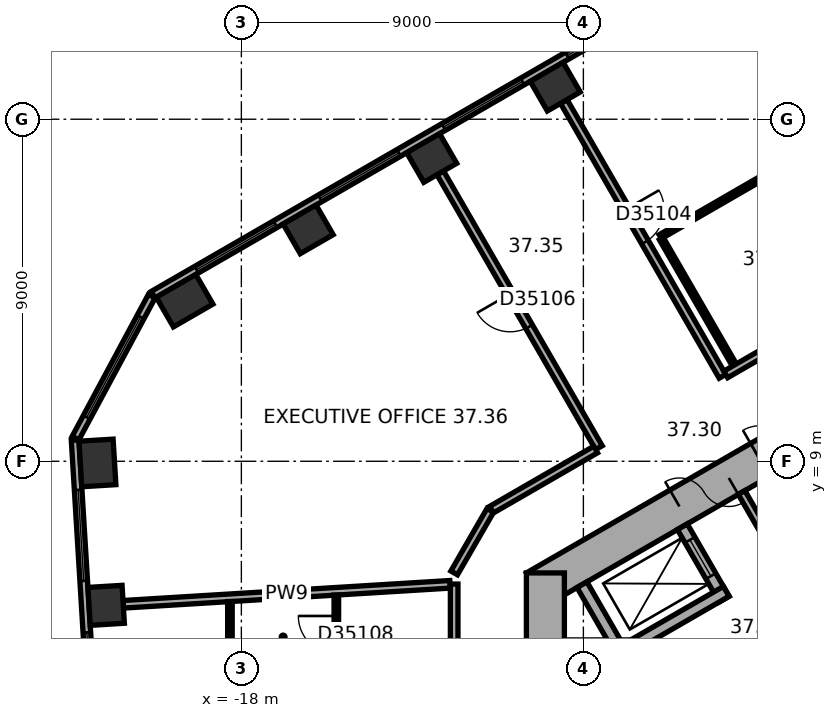
"""IFC4 building model, lengths in metres.
Left out: names, types, materials, properties, quantities, classifications, styles, units other than length and angle.
Written with IfcOpenShell. Run it as: python <this file> out.ifc"""

import sys

from ifc_helpers import new_model, si_unit, direction, frame, frame_2d, origin, origin_2d, place, context, subcontext, project, spatial, rectangle, extrude, element, fill, save


model = new_model("IFC4")
c1 = context("Model", 3, precision=1e-05, world=origin(), true_north=direction((0.0, 1.0)))
c2 = subcontext(c1, "Body", "Model", "MODEL_VIEW")
j1 = project(units=[si_unit("LENGTHUNIT", "METRE"), si_unit("PLANEANGLEUNIT", "RADIAN")], contexts=[c1])
p1 = place(None, origin())
s1 = spatial("IfcSite", under=j1, at=p1, CompositionType="ELEMENT")
p2 = place(p1, origin())
s2 = spatial("IfcBuilding", under=s1, at=p2, CompositionType="ELEMENT")
p3 = place(p2, frame((0.0, 0.0, 154.0)))
s3 = spatial("IfcBuildingStorey", under=s2, at=p3, CompositionType="ELEMENT", Elevation=154.0)
for number, where, z_axis, x_axis in (
    (1, (-9.74, 18.856, 0.0), (0.0, 0.0, 1.0), (-0.866, -0.5, 0.0)),
    (2, (-12.991, 16.979, 0.0), (0.0, 0.0, 1.0), (-0.866, -0.5, 0.0)),
    (3, (-16.242, 15.102, 0.0), (0.0, 0.0, 1.0), (-0.866, -0.5, 0.0)),
):
    element("IfcColumn", number, at=place(p3, frame(where, z_axis=z_axis, x_axis=x_axis)), inside=s3, PredefinedType="COLUMN", context=c2, shape_type="SweptSolid", body=[
        extrude(rectangle(XDim=1.0, YDim=0.9, at=origin_2d()), origin(), (0.0, 0.0, 1.0), 3.7),
    ])
for number, where, z_axis, x_axis in (
    (4, (-19.494, 13.225, 0.0), (0.0, 0.0, 1.0), (-0.866, -0.5, 0.0)),
    (5, (-21.787, 8.956, 0.0), (0.0, 0.0, 1.0), (0.061, -0.998, 0.0)),
):
    element("IfcColumn", number, at=place(p3, frame(where, z_axis=z_axis, x_axis=x_axis)), inside=s3, PredefinedType="COLUMN", context=c2, shape_type="SweptSolid", body=[
        extrude(rectangle(XDim=1.2, YDim=0.9, at=origin_2d()), origin(), (0.0, 0.0, 1.0), 3.7),
    ])
p4 = place(p3, frame((-21.558, 5.209, 0.0), z_axis=(0.0, 0.0, 1.0), x_axis=(0.061048539535, -0.998134798422, 0.0)))
e6 = element("IfcColumn", 6, at=p4, inside=s3, PredefinedType="COLUMN", context=c2, shape_type="SweptSolid", body=[
    extrude(rectangle(XDim=1.0, YDim=0.9, at=origin_2d()), origin(), (0.0, 0.0, 1.0), 3.7),
])
p5 = place(p3, frame((0.25, 11.691, 0.0), z_axis=(0.0, 0.0, 1.0), x_axis=(-0.866022616891, -0.50000482701, 0.0)))
e7 = element("IfcWall", 7, at=p5, inside=s3, PredefinedType="SHEAR", context=c2, shape_type="SweptSolid", body=[
    extrude(rectangle(XDim=12.125, YDim=1.0, at=frame_2d((6.062, 0.0))), origin(), (0.0, 0.0, 1.0), 3.7),
])
p6 = place(p5, frame((6.262, 0.0, 0.0)))
e8 = element("IfcOpeningElement", 8, at=p6, cuts=e7, PredefinedType="OPENING", context=c2, shape_type="SweptSolid", body=[
    extrude(rectangle(XDim=1.5, YDim=2.1, at=frame_2d((0.75, 1.05))), frame((0.0, 0.51, 0.0), z_axis=(0.0, -1.0, 0.0), x_axis=(1.0, 0.0, 0.0)), (0.0, 0.0, 1.0), 1.02),
])
p7 = place(p5, frame((1.812, 0.0, 0.0)))
e9 = element("IfcOpeningElement", 9, at=p7, cuts=e7, PredefinedType="OPENING", context=c2, shape_type="SweptSolid", body=[
    extrude(rectangle(XDim=0.9, YDim=2.1, at=frame_2d((0.45, 1.05))), frame((0.0, 0.51, 0.0), z_axis=(0.0, -1.0, 0.0), x_axis=(1.0, 0.0, 0.0)), (0.0, 0.0, 1.0), 1.02),
])
p8 = place(p5, frame((4.412, 0.0, 0.0)))
e10 = element("IfcOpeningElement", 10, at=p8, cuts=e7, PredefinedType="OPENING", context=c2, shape_type="SweptSolid", body=[
    extrude(rectangle(XDim=0.9, YDim=2.1, at=frame_2d((0.45, 1.05))), frame((0.0, 0.51, 0.0), z_axis=(0.0, -1.0, 0.0), x_axis=(1.0, 0.0, 0.0)), (0.0, 0.0, 1.0), 1.02),
])
p9 = place(p3, frame((-10.0, 6.062, 0.0), z_axis=(0.0, 0.0, 1.0), x_axis=(0.0, -1.0, 0.0)))
e11 = element("IfcWall", 11, at=p9, inside=s3, PredefinedType="SHEAR", context=c2, shape_type="SweptSolid", body=[
    extrude(rectangle(XDim=12.125, YDim=1.0, at=frame_2d((6.062, 0.0))), origin(), (0.0, 0.0, 1.0), 3.7),
])
p10 = place(p9, frame((5.212, 0.0, 0.0)))
e12 = element("IfcOpeningElement", 12, at=p10, cuts=e11, PredefinedType="OPENING", context=c2, shape_type="SweptSolid", body=[
    extrude(rectangle(XDim=1.1, YDim=2.1, at=frame_2d((0.55, 1.05))), frame((0.0, 0.51, 0.0), z_axis=(0.0, -1.0, 0.0), x_axis=(1.0, 0.0, 0.0)), (0.0, 0.0, 1.0), 1.02),
])
p11 = place(p9, frame((7.812, 0.0, 0.0)))
e13 = element("IfcOpeningElement", 13, at=p11, cuts=e11, PredefinedType="OPENING", context=c2, shape_type="SweptSolid", body=[
    extrude(rectangle(XDim=1.1, YDim=2.1, at=frame_2d((0.55, 1.05))), frame((0.0, 0.51, 0.0), z_axis=(0.0, -1.0, 0.0), x_axis=(1.0, 0.0, 0.0)), (0.0, 0.0, 1.0), 1.02),
])
p12 = place(p3, frame((-2.961, 23.405, 0.0), z_axis=(0.0, 0.0, 1.0), x_axis=(-0.866023315909, -0.500003616288, 0.0)))
e14 = element("IfcWall", 14, at=p12, inside=s3, PredefinedType="STANDARD", context=c2, shape_type="SweptSolid", body=[
    extrude(rectangle(XDim=20.044, YDim=0.2, at=frame_2d((10.022, 0.0))), origin(), (0.0, 0.0, 1.0), 3.7),
])
p13 = place(p12, frame((1.314, 0.0, 0.9)))
e15 = element("IfcOpeningElement", 15, at=p13, cuts=e14, PredefinedType="OPENING", context=c2, shape_type="SweptSolid", body=[
    extrude(rectangle(XDim=2.4, YDim=2.0, at=frame_2d((1.2, 1.0))), frame((0.0, 0.11, 0.0), z_axis=(0.0, -1.0, 0.0), x_axis=(1.0, 0.0, 0.0)), (0.0, 0.0, 1.0), 0.22),
])
p14 = place(p12, frame((5.069, 0.0, 0.9)))
e16 = element("IfcOpeningElement", 16, at=p14, cuts=e14, PredefinedType="OPENING", context=c2, shape_type="SweptSolid", body=[
    extrude(rectangle(XDim=2.4, YDim=2.0, at=frame_2d((1.2, 1.0))), frame((0.0, 0.11, 0.0), z_axis=(0.0, -1.0, 0.0), x_axis=(1.0, 0.0, 0.0)), (0.0, 0.0, 1.0), 0.22),
])
p15 = place(p12, frame((8.823, 0.0, 0.9)))
e17 = element("IfcOpeningElement", 17, at=p15, cuts=e14, PredefinedType="OPENING", context=c2, shape_type="SweptSolid", body=[
    extrude(rectangle(XDim=2.4, YDim=2.0, at=frame_2d((1.2, 1.0))), frame((0.0, 0.11, 0.0), z_axis=(0.0, -1.0, 0.0), x_axis=(1.0, 0.0, 0.0)), (0.0, 0.0, 1.0), 0.22),
])
p16 = place(p12, frame((12.577, 0.0, 0.9)))
e18 = element("IfcOpeningElement", 18, at=p16, cuts=e14, PredefinedType="OPENING", context=c2, shape_type="SweptSolid", body=[
    extrude(rectangle(XDim=2.4, YDim=2.0, at=frame_2d((1.2, 1.0))), frame((0.0, 0.11, 0.0), z_axis=(0.0, -1.0, 0.0), x_axis=(1.0, 0.0, 0.0)), (0.0, 0.0, 1.0), 0.22),
])
p17 = place(p12, frame((16.331, 0.0, 0.9)))
e19 = element("IfcOpeningElement", 19, at=p17, cuts=e14, PredefinedType="OPENING", context=c2, shape_type="SweptSolid", body=[
    extrude(rectangle(XDim=2.4, YDim=2.0, at=frame_2d((1.2, 1.0))), frame((0.0, 0.11, 0.0), z_axis=(0.0, -1.0, 0.0), x_axis=(1.0, 0.0, 0.0)), (0.0, 0.0, 1.0), 0.22),
])
p18 = place(p3, frame((-20.357, 13.344, 0.0), z_axis=(0.0, 0.0, 1.0), x_axis=(-0.473288913494, -0.880907262068, 0.0)))
e20 = element("IfcWall", 20, at=p18, inside=s3, PredefinedType="STANDARD", context=c2, shape_type="SweptSolid", body=[
    extrude(rectangle(XDim=4.238, YDim=0.2, at=frame_2d((2.119, 0.0))), origin(), (0.0, 0.0, 1.0), 3.7),
])
p19 = place(p18, frame((0.619, 0.0, 0.9)))
e21 = element("IfcOpeningElement", 21, at=p19, cuts=e20, PredefinedType="OPENING", context=c2, shape_type="SweptSolid", body=[
    extrude(rectangle(XDim=3.0, YDim=2.0, at=frame_2d((1.5, 1.0))), frame((0.0, 0.11, 0.0), z_axis=(0.0, -1.0, 0.0), x_axis=(1.0, 0.0, 0.0)), (0.0, 0.0, 1.0), 0.22),
])
p20 = place(p3, frame((-22.375, 9.557, 0.0), z_axis=(0.0, 0.0, 1.0), x_axis=(0.061036015339, -0.998135564356, 0.0)))
e22 = element("IfcWall", 22, at=p20, inside=s3, PredefinedType="STANDARD", context=c2, shape_type="SweptSolid", body=[
    extrude(rectangle(XDim=20.044, YDim=0.2, at=frame_2d((10.022, 0.0))), origin(), (0.0, 0.0, 1.0), 3.7),
])
p21 = place(p20, frame((1.313, 0.0, 0.9)))
e23 = element("IfcOpeningElement", 23, at=p21, cuts=e22, PredefinedType="OPENING", context=c2, shape_type="SweptSolid", body=[
    extrude(rectangle(XDim=2.4, YDim=2.0, at=frame_2d((1.2, 1.0))), frame((0.0, 0.11, 0.0), z_axis=(0.0, -1.0, 0.0), x_axis=(1.0, 0.0, 0.0)), (0.0, 0.0, 1.0), 0.22),
])
p22 = place(p20, frame((5.067, 0.0, 0.9)))
e24 = element("IfcOpeningElement", 24, at=p22, cuts=e22, PredefinedType="OPENING", context=c2, shape_type="SweptSolid", body=[
    extrude(rectangle(XDim=2.4, YDim=2.0, at=frame_2d((1.2, 1.0))), frame((0.0, 0.11, 0.0), z_axis=(0.0, -1.0, 0.0), x_axis=(1.0, 0.0, 0.0)), (0.0, 0.0, 1.0), 0.22),
])
p23 = place(p20, frame((8.821, 0.0, 0.9)))
e25 = element("IfcOpeningElement", 25, at=p23, cuts=e22, PredefinedType="OPENING", context=c2, shape_type="SweptSolid", body=[
    extrude(rectangle(XDim=2.4, YDim=2.0, at=frame_2d((1.2, 1.0))), frame((0.0, 0.11, 0.0), z_axis=(0.0, -1.0, 0.0), x_axis=(1.0, 0.0, 0.0)), (0.0, 0.0, 1.0), 0.22),
])
p24 = place(p20, frame((12.575, 0.0, 0.9)))
e26 = element("IfcOpeningElement", 26, at=p24, cuts=e22, PredefinedType="OPENING", context=c2, shape_type="SweptSolid", body=[
    extrude(rectangle(XDim=2.4, YDim=2.0, at=frame_2d((1.2, 1.0))), frame((0.0, 0.11, 0.0), z_axis=(0.0, -1.0, 0.0), x_axis=(1.0, 0.0, 0.0)), (0.0, 0.0, 1.0), 0.22),
])
p25 = place(p20, frame((16.329, 0.0, 0.9)))
e27 = element("IfcOpeningElement", 27, at=p25, cuts=e22, PredefinedType="OPENING", context=c2, shape_type="SweptSolid", body=[
    extrude(rectangle(XDim=2.4, YDim=2.0, at=frame_2d((1.2, 1.0))), frame((0.0, 0.11, 0.0), z_axis=(0.0, -1.0, 0.0), x_axis=(1.0, 0.0, 0.0)), (0.0, 0.0, 1.0), 0.22),
])
p26 = place(p3, frame((-3.737, 6.272, 0.0), z_axis=(0.0, 0.0, 1.0), x_axis=(-0.50002983664, 0.866008176907, 0.0)))
e28 = element("IfcWall", 28, at=p26, inside=s3, PredefinedType="PARTITIONING", context=c2, shape_type="SweptSolid", body=[
    extrude(rectangle(XDim=2.2, YDim=0.2, at=frame_2d((1.1, 0.0))), origin(), (0.0, 0.0, 1.0), 3.42),
])
p27 = place(p3, frame((-5.295, 5.372, 0.0), z_axis=(0.0, 0.0, 1.0), x_axis=(-0.500077893725, 0.86598042715, 0.0)))
e29 = element("IfcWall", 29, at=p27, inside=s3, PredefinedType="SHEAR", context=c2, shape_type="SweptSolid", body=[
    extrude(rectangle(XDim=2.2, YDim=0.3, at=frame_2d((1.1, 0.0))), origin(), (0.0, 0.0, 1.0), 3.42),
])
p28 = place(p27, frame((0.7, 0.0, 0.0)))
e30 = element("IfcOpeningElement", 30, at=p28, cuts=e29, PredefinedType="OPENING", context=c2, shape_type="SweptSolid", body=[
    extrude(rectangle(XDim=1.1, YDim=2.1, at=frame_2d((0.55, 1.05))), frame((0.0, 0.16, 0.0), z_axis=(0.0, -1.0, 0.0), x_axis=(1.0, 0.0, 0.0)), (0.0, 0.0, 1.0), 0.32),
])
p29 = place(p3, frame((-5.24, 5.577, 0.0), z_axis=(0.0, 0.0, 1.0), x_axis=(-0.866014461049, -0.500018952895, 0.0)))
e31 = element("IfcWall", 31, at=p29, inside=s3, PredefinedType="SHEAR", context=c2, shape_type="SweptSolid", body=[
    extrude(rectangle(XDim=3.35, YDim=0.3, at=frame_2d((1.675, 0.0))), origin(), (0.0, 0.0, 1.0), 3.42),
])
p30 = place(p3, frame((-7.937, 3.847, 0.0), z_axis=(0.0, 0.0, 1.0), x_axis=(-0.50002983664, 0.866008176907, 0.0)))
e32 = element("IfcWall", 32, at=p30, inside=s3, PredefinedType="SHEAR", context=c2, shape_type="SweptSolid", body=[
    extrude(rectangle(XDim=2.2, YDim=0.3, at=frame_2d((1.1, 0.0))), origin(), (0.0, 0.0, 1.0), 3.42),
])
p31 = place(p3, frame((-21.109, 5.237, 0.0), z_axis=(0.0, 0.0, 1.0), x_axis=(0.998135264293, 0.061040922131, 0.0)))
e33 = element("IfcWall", 33, at=p31, inside=s3, PredefinedType="PARTITIONING", context=c2, shape_type="SweptSolid", body=[
    extrude(rectangle(XDim=8.615, YDim=0.2, at=frame_2d((4.308, 0.0))), origin(), (0.0, 0.0, 1.0), 3.42),
])
p32 = place(p3, frame((-18.301, 5.308, 0.0), z_axis=(0.0, 0.0, 1.0), x_axis=(0.0, -1.0, 0.0)))
e34 = element("IfcWall", 34, at=p32, inside=s3, PredefinedType="PARTITIONING", context=c2, shape_type="SweptSolid", body=[
    extrude(rectangle(XDim=1.869, YDim=0.12, at=frame_2d((0.934, 0.0))), origin(), (0.0, 0.0, 1.0), 3.42),
])
p33 = place(p3, frame((-15.501, 5.479, 0.0), z_axis=(0.0, 0.0, 1.0), x_axis=(0.0, -1.0, 0.0)))
e35 = element("IfcWall", 35, at=p33, inside=s3, PredefinedType="PARTITIONING", context=c2, shape_type="SweptSolid", body=[
    extrude(rectangle(XDim=11.083, YDim=0.12, at=frame_2d((5.542, 0.0))), origin(), (0.0, 0.0, 1.0), 3.42),
])
p34 = place(p33, frame((0.55, 0.0, 0.0)))
e36 = element("IfcOpeningElement", 36, at=p34, cuts=e35, PredefinedType="OPENING", context=c2, shape_type="SweptSolid", body=[
    extrude(rectangle(XDim=1.0, YDim=2.1, at=frame_2d((0.5, 1.05))), frame((0.0, 0.07, 0.0), z_axis=(0.0, -1.0, 0.0), x_axis=(1.0, 0.0, 0.0)), (0.0, 0.0, 1.0), 0.14),
])
p35 = place(p33, frame((3.636, 0.0, 0.0)))
e37 = element("IfcOpeningElement", 37, at=p35, cuts=e35, PredefinedType="OPENING", context=c2, shape_type="SweptSolid", body=[
    extrude(rectangle(XDim=0.9, YDim=2.1, at=frame_2d((0.45, 1.05))), frame((0.0, 0.07, 0.0), z_axis=(0.0, -1.0, 0.0), x_axis=(1.0, 0.0, 0.0)), (0.0, 0.0, 1.0), 0.14),
])
p36 = place(p33, frame((8.127, 0.0, 0.0)))
e38 = element("IfcOpeningElement", 38, at=p36, cuts=e35, PredefinedType="OPENING", context=c2, shape_type="SweptSolid", body=[
    extrude(rectangle(XDim=0.9, YDim=2.1, at=frame_2d((0.45, 1.05))), frame((0.0, 0.07, 0.0), z_axis=(0.0, -1.0, 0.0), x_axis=(1.0, 0.0, 0.0)), (0.0, 0.0, 1.0), 0.14),
])
p37 = place(p3, frame((-12.766, 16.589, 0.0), z_axis=(0.0, 0.0, 1.0), x_axis=(0.500010139422, -0.866019549707, 0.0)))
e39 = element("IfcWall", 39, at=p37, inside=s3, PredefinedType="PARTITIONING", context=c2, shape_type="SweptSolid", body=[
    extrude(rectangle(XDim=8.35, YDim=0.2, at=frame_2d((4.175, 0.0))), origin(), (0.0, 0.0, 1.0), 3.42),
])
p38 = place(p37, frame((3.675, 0.0, 0.0)))
e40 = element("IfcOpeningElement", 40, at=p38, cuts=e39, PredefinedType="OPENING", context=c2, shape_type="SweptSolid", body=[
    extrude(rectangle(XDim=1.0, YDim=2.1, at=frame_2d((0.5, 1.05))), frame((0.0, 0.11, 0.0), z_axis=(0.0, -1.0, 0.0), x_axis=(1.0, 0.0, 0.0)), (0.0, 0.0, 1.0), 0.22),
])
p39 = place(p3, frame((-12.4, 5.769, 0.0), z_axis=(0.0, 0.0, 1.0), x_axis=(0.0, -1.0, 0.0)))
e41 = element("IfcWall", 41, at=p39, inside=s3, PredefinedType="PARTITIONING", context=c2, shape_type="SweptSolid", body=[
    extrude(rectangle(XDim=3.568, YDim=0.2, at=frame_2d((1.784, 0.0))), origin(), (0.0, 0.0, 1.0), 3.42),
])
p40 = place(p3, frame((-11.45, 7.708, 0.0), z_axis=(0.0, 0.0, 1.0), x_axis=(-0.500022797313, -0.86601224135, 0.0)))
e42 = element("IfcWall", 42, at=p40, inside=s3, PredefinedType="PARTITIONING", context=c2, shape_type="SweptSolid", body=[
    extrude(rectangle(XDim=1.9, YDim=0.2, at=frame_2d((0.95, 0.0))), origin(), (0.0, 0.0, 1.0), 3.42),
])
p41 = place(p3, frame((-9.515, 18.466, 0.0), z_axis=(0.0, 0.0, 1.0), x_axis=(0.500010139422, -0.866019549707, 0.0)))
e43 = element("IfcWall", 43, at=p41, inside=s3, PredefinedType="PARTITIONING", context=c2, shape_type="SweptSolid", body=[
    extrude(rectangle(XDim=8.35, YDim=0.2, at=frame_2d((4.175, 0.0))), origin(), (0.0, 0.0, 1.0), 2.87),
])
p42 = place(p41, frame((3.275, 0.0, 0.0)))
e44 = element("IfcOpeningElement", 44, at=p42, cuts=e43, PredefinedType="OPENING", context=c2, shape_type="SweptSolid", body=[
    extrude(rectangle(XDim=1.0, YDim=2.1, at=frame_2d((0.5, 1.05))), frame((0.0, 0.11, 0.0), z_axis=(0.0, -1.0, 0.0), x_axis=(1.0, 0.0, 0.0)), (0.0, 0.0, 1.0), 0.22),
])
p43 = place(p3, frame((-8.678, 9.308, 0.0), z_axis=(0.0, 0.0, 1.0), x_axis=(-0.866000359435, -0.500043375578, 0.0)))
e45 = element("IfcWall", 45, at=p43, inside=s3, PredefinedType="PARTITIONING", context=c2, shape_type="SweptSolid", body=[
    extrude(rectangle(XDim=3.161, YDim=0.2, at=frame_2d((1.581, 0.0))), origin(), (0.0, 0.0, 1.0), 3.42),
])
p44 = place(p3, frame((-6.977, 14.909, 0.0), z_axis=(0.0, 0.0, 1.0), x_axis=(0.866032203192, 0.499988222896, 0.0)))
e46 = element("IfcWall", 46, at=p44, inside=s3, PredefinedType="PARTITIONING", context=c2, shape_type="SweptSolid", body=[
    extrude(rectangle(XDim=4.4, YDim=0.12, at=frame_2d((2.2, 0.0))), origin(), (0.0, 0.0, 1.0), 3.42),
])
p45 = place(p3, frame((-5.027, 11.531, 0.0), z_axis=(0.0, 0.0, 1.0), x_axis=(-0.499995802899, 0.866027826969, 0.0)))
e47 = element("IfcWall", 47, at=p45, inside=s3, PredefinedType="PARTITIONING", context=c2, shape_type="SweptSolid", body=[
    extrude(rectangle(XDim=3.84, YDim=0.12, at=frame_2d((1.92, 0.0))), origin(), (0.0, 0.0, 1.0), 3.42),
])
p46 = place(p3, frame((-1.167, 13.645, 0.0), z_axis=(0.0, 0.0, 1.0), x_axis=(-0.866034830959, -0.499983671299, 0.0)))
e48 = element("IfcWall", 48, at=p46, inside=s3, PredefinedType="PARTITIONING", context=c2, shape_type="SweptSolid", body=[
    extrude(rectangle(XDim=4.719, YDim=0.2, at=frame_2d((2.36, 0.0))), origin(), (0.0, 0.0, 1.0), 3.42),
])
p47 = place(p14, origin())
e49 = element("IfcWindow", 49, at=p47, inside=s3, PartitioningType="SINGLE_PANEL", PredefinedType="WINDOW", context=c2, shape_type="SweptSolid", body=[
    extrude(rectangle(XDim=2.4, YDim=2.0, at=frame_2d((1.2, 1.0))), frame((0.0, 0.03, 0.0), z_axis=(0.0, -1.0, 0.0), x_axis=(1.0, 0.0, 0.0)), (0.0, 0.0, 1.0), 0.06),
])
fill(e16, e49)
p48 = place(p15, origin())
e50 = element("IfcWindow", 50, at=p48, inside=s3, PartitioningType="SINGLE_PANEL", PredefinedType="WINDOW", context=c2, shape_type="SweptSolid", body=[
    extrude(rectangle(XDim=2.4, YDim=2.0, at=frame_2d((1.2, 1.0))), frame((0.0, 0.03, 0.0), z_axis=(0.0, -1.0, 0.0), x_axis=(1.0, 0.0, 0.0)), (0.0, 0.0, 1.0), 0.06),
])
fill(e17, e50)
p49 = place(p16, origin())
e51 = element("IfcWindow", 51, at=p49, inside=s3, PartitioningType="SINGLE_PANEL", PredefinedType="WINDOW", context=c2, shape_type="SweptSolid", body=[
    extrude(rectangle(XDim=2.4, YDim=2.0, at=frame_2d((1.2, 1.0))), frame((0.0, 0.03, 0.0), z_axis=(0.0, -1.0, 0.0), x_axis=(1.0, 0.0, 0.0)), (0.0, 0.0, 1.0), 0.06),
])
fill(e18, e51)
p50 = place(p17, origin())
e52 = element("IfcWindow", 52, at=p50, inside=s3, PartitioningType="SINGLE_PANEL", PredefinedType="WINDOW", context=c2, shape_type="SweptSolid", body=[
    extrude(rectangle(XDim=2.4, YDim=2.0, at=frame_2d((1.2, 1.0))), frame((0.0, 0.03, 0.0), z_axis=(0.0, -1.0, 0.0), x_axis=(1.0, 0.0, 0.0)), (0.0, 0.0, 1.0), 0.06),
])
fill(e19, e52)
p51 = place(p19, origin())
e53 = element("IfcWindow", 53, at=p51, inside=s3, PartitioningType="SINGLE_PANEL", PredefinedType="WINDOW", context=c2, shape_type="SweptSolid", body=[
    extrude(rectangle(XDim=3.0, YDim=2.0, at=frame_2d((1.5, 1.0))), frame((0.0, 0.03, 0.0), z_axis=(0.0, -1.0, 0.0), x_axis=(1.0, 0.0, 0.0)), (0.0, 0.0, 1.0), 0.06),
])
fill(e21, e53)
p52 = place(p21, origin())
e54 = element("IfcWindow", 54, at=p52, inside=s3, PartitioningType="SINGLE_PANEL", PredefinedType="WINDOW", context=c2, shape_type="SweptSolid", body=[
    extrude(rectangle(XDim=2.4, YDim=2.0, at=frame_2d((1.2, 1.0))), frame((0.0, 0.03, 0.0), z_axis=(0.0, -1.0, 0.0), x_axis=(1.0, 0.0, 0.0)), (0.0, 0.0, 1.0), 0.06),
])
fill(e23, e54)
p53 = place(p22, origin())
e55 = element("IfcWindow", 55, at=p53, inside=s3, PartitioningType="SINGLE_PANEL", PredefinedType="WINDOW", context=c2, shape_type="SweptSolid", body=[
    extrude(rectangle(XDim=2.4, YDim=2.0, at=frame_2d((1.2, 1.0))), frame((0.0, 0.03, 0.0), z_axis=(0.0, -1.0, 0.0), x_axis=(1.0, 0.0, 0.0)), (0.0, 0.0, 1.0), 0.06),
])
fill(e24, e55)
p54 = place(p6, origin())
e56 = element("IfcDoor", 56, at=p54, inside=s3, OperationType="DOUBLE_DOOR_SINGLE_SWING", PredefinedType="DOOR", context=c2, shape_type="SweptSolid", body=[
    extrude(rectangle(XDim=1.5, YDim=2.1, at=frame_2d((0.75, 1.05))), frame((0.0, 0.025, 0.0), z_axis=(0.0, -1.0, 0.0), x_axis=(1.0, 0.0, 0.0)), (0.0, 0.0, 1.0), 0.05),
])
fill(e8, e56)
p55 = place(p28, origin())
e57 = element("IfcDoor", 57, at=p55, inside=s3, OperationType="DOUBLE_DOOR_SLIDING", PredefinedType="DOOR", context=c2, shape_type="SweptSolid", body=[
    extrude(rectangle(XDim=1.1, YDim=2.1, at=frame_2d((0.55, 1.05))), frame((0.0, 0.025, 0.0), z_axis=(0.0, -1.0, 0.0), x_axis=(1.0, 0.0, 0.0)), (0.0, 0.0, 1.0), 0.05),
])
fill(e30, e57)
p56 = place(p42, origin())
e58 = element("IfcDoor", 58, at=p56, inside=s3, OperationType="SINGLE_SWING_LEFT", PredefinedType="DOOR", context=c2, shape_type="SweptSolid", body=[
    extrude(rectangle(XDim=1.0, YDim=2.1, at=frame_2d((0.5, 1.05))), frame((0.0, 0.025, 0.0), z_axis=(0.0, -1.0, 0.0), x_axis=(1.0, 0.0, 0.0)), (0.0, 0.0, 1.0), 0.05),
])
fill(e44, e58)
p57 = place(p38, origin())
e59 = element("IfcDoor", 59, at=p57, inside=s3, OperationType="SINGLE_SWING_LEFT", PredefinedType="DOOR", context=c2, shape_type="SweptSolid", body=[
    extrude(rectangle(XDim=1.0, YDim=2.1, at=frame_2d((0.5, 1.05))), frame((0.0, 0.025, 0.0), z_axis=(0.0, -1.0, 0.0), x_axis=(1.0, 0.0, 0.0)), (0.0, 0.0, 1.0), 0.05),
])
fill(e40, e59)
p58 = place(p34, origin())
e60 = element("IfcDoor", 60, at=p58, inside=s3, OperationType="SINGLE_SWING_LEFT", PredefinedType="DOOR", context=c2, shape_type="SweptSolid", body=[
    extrude(rectangle(XDim=1.0, YDim=2.1, at=frame_2d((0.5, 1.05))), frame((0.0, 0.025, 0.0), z_axis=(0.0, -1.0, 0.0), x_axis=(1.0, 0.0, 0.0)), (0.0, 0.0, 1.0), 0.05),
])
fill(e36, e60)
save(model, sys.argv[1])
